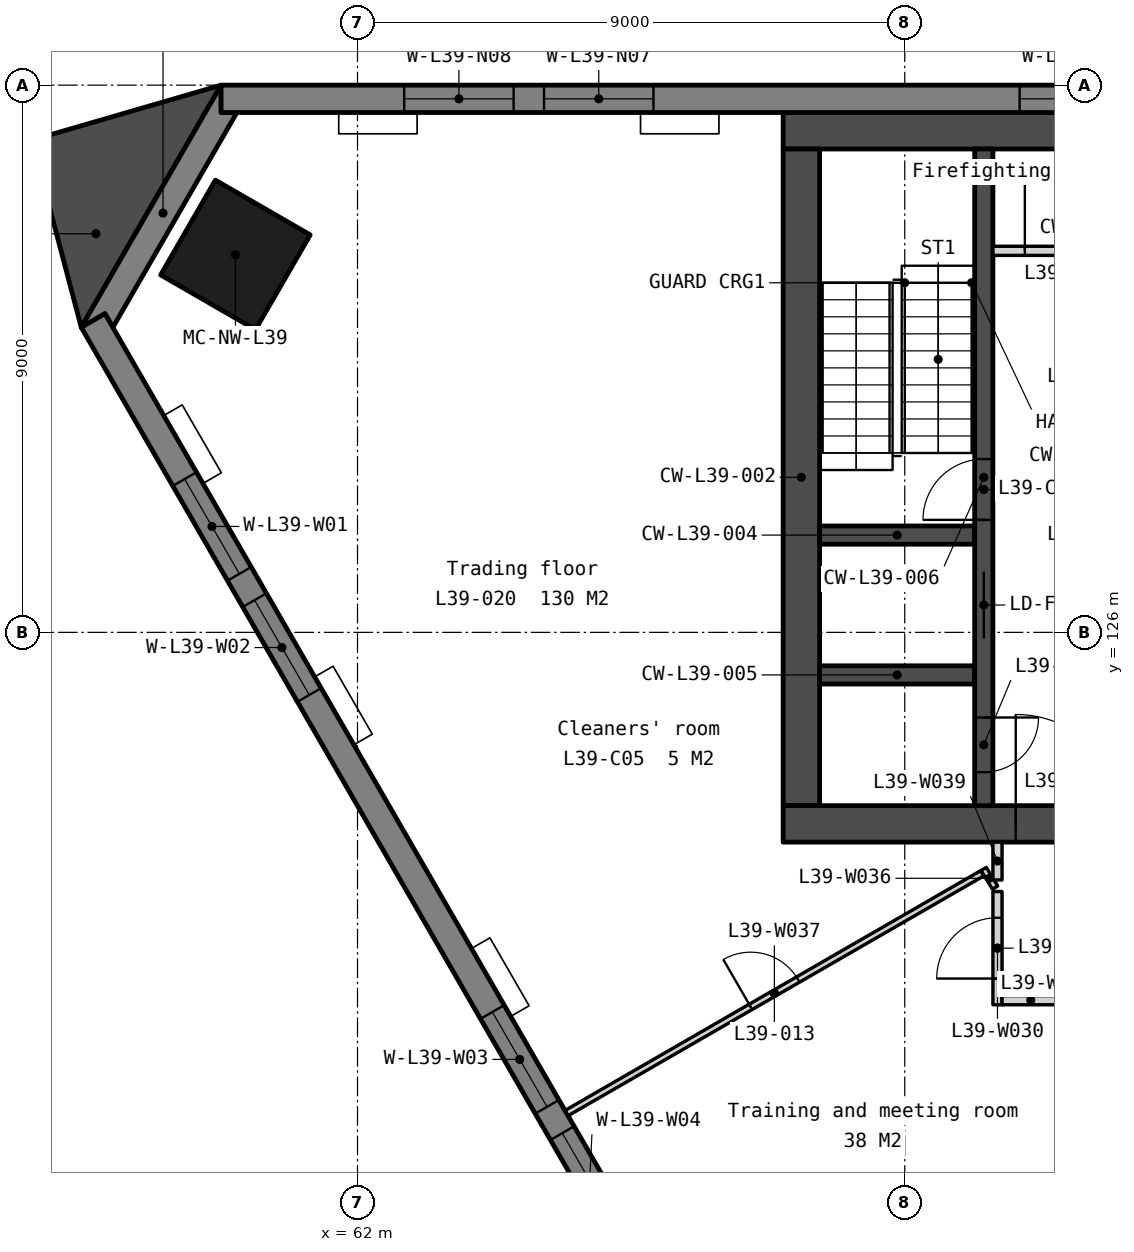
"""IFC4 building model, lengths in metres.
Left out: names, types, materials, properties, quantities, classifications, styles, units other than length and angle.
Written with IfcOpenShell. Run it as: python <this file> out.ifc"""

import sys

from ifc_helpers import new_model, si_unit, direction, frame, frame_2d, origin, origin_2d, place, context, subcontext, project, spatial, polyline, rectangle, outline, extrude, element, fill, save


model = new_model("IFC4")
c1 = context("Model", 3, precision=1e-05, world=origin(), true_north=direction((0.0, 1.0)))
c2 = subcontext(c1, "Body", "Model", "MODEL_VIEW")
j1 = project(units=[si_unit("LENGTHUNIT", "METRE"), si_unit("PLANEANGLEUNIT", "RADIAN")], contexts=[c1])
p1 = place(None, origin())
s1 = spatial("IfcSite", under=j1, at=p1, CompositionType="ELEMENT")
p2 = place(p1, origin())
s2 = spatial("IfcBuilding", under=s1, at=p2, CompositionType="ELEMENT")
p3 = place(p2, frame((0.0, 0.0, 155.9)))
s3 = spatial("IfcBuildingStorey", under=s2, at=p3, CompositionType="ELEMENT", Elevation=155.9)
p4 = place(p3, frame((59.993, 132.208, 0.0), z_axis=(0.0, 0.0, 1.0), x_axis=(-0.5, -0.866025403784, 0.0)))
e1 = element("IfcColumn", 1, at=p4, inside=s3, PredefinedType="COLUMN", context=c2, shape_type="SweptSolid", body=[
    extrude(rectangle(XDim=1.8, YDim=1.8, at=origin_2d()), origin(), (0.0, 0.0, 1.0), 3.9),
])
p5 = place(p3, frame((69.0, 134.25, 0.0), z_axis=(0.0, 0.0, 1.0), x_axis=(1.0, 0.0, 0.0)))
e2 = element("IfcWall", 2, at=p5, inside=s3, PredefinedType="SOLIDWALL", context=c2, shape_type="SweptSolid", body=[
    extrude(rectangle(XDim=22.0, YDim=0.6, at=frame_2d((11.0, 0.0))), origin(), (0.0, 0.0, 1.0), 3.75),
])
p6 = place(p3, frame((69.3, 133.95, 0.0), z_axis=(0.0, 0.0, 1.0), x_axis=(0.0, -1.0, 0.0)))
e3 = element("IfcWall", 3, at=p6, inside=s3, PredefinedType="SOLIDWALL", context=c2, shape_type="SweptSolid", body=[
    extrude(rectangle(XDim=10.8, YDim=0.6, at=frame_2d((5.4, 0.0))), origin(), (0.0, 0.0, 1.0), 3.75),
])
p7 = place(p3, frame((69.0, 122.85, 0.0), z_axis=(0.0, 0.0, 1.0), x_axis=(1.0, 0.0, 0.0)))
e4 = element("IfcWall", 4, at=p7, inside=s3, PredefinedType="SOLIDWALL", context=c2, shape_type="SweptSolid", body=[
    extrude(rectangle(XDim=22.0, YDim=0.6, at=frame_2d((11.0, 0.0))), origin(), (0.0, 0.0, 1.0), 3.75),
])
p8 = place(p7, frame((16.375, 0.0, 0.0)))
e5 = element("IfcOpeningElement", 5, at=p8, cuts=e4, PredefinedType="OPENING", context=c2, shape_type="SweptSolid", body=[
    extrude(rectangle(XDim=1.8, YDim=2.1, at=frame_2d((0.9, 1.05))), frame((0.0, 0.31, 0.0), z_axis=(0.0, -1.0, 0.0), x_axis=(1.0, 0.0, 0.0)), (0.0, 0.0, 1.0), 0.62),
])
p9 = place(p7, frame((3.825, 0.0, 0.0)))
e6 = element("IfcOpeningElement", 6, at=p9, cuts=e4, PredefinedType="OPENING", context=c2, shape_type="SweptSolid", body=[
    extrude(rectangle(XDim=1.8, YDim=2.1, at=frame_2d((0.9, 1.05))), frame((0.0, 0.31, 0.0), z_axis=(0.0, -1.0, 0.0), x_axis=(1.0, 0.0, 0.0)), (0.0, 0.0, 1.0), 0.62),
])
p10 = place(p7, frame((12.85, 0.0, 0.0)))
e7 = element("IfcOpeningElement", 7, at=p10, cuts=e4, PredefinedType="OPENING", context=c2, shape_type="SweptSolid", body=[
    extrude(rectangle(XDim=1.5, YDim=2.1, at=frame_2d((0.75, 1.05))), frame((0.0, 0.31, 0.0), z_axis=(0.0, -1.0, 0.0), x_axis=(1.0, 0.0, 0.0)), (0.0, 0.0, 1.0), 0.62),
])
for number, where, z_axis, x_axis in (
    (8, (69.6, 127.6, 0.0), (0.0, 0.0, 1.0), (1.0, 0.0, 0.0)),
    (9, (69.6, 125.3, 0.0), (0.0, 0.0, 1.0), (1.0, 0.0, 0.0)),
):
    element("IfcWall", number, at=place(p3, frame(where, z_axis=z_axis, x_axis=x_axis)), inside=s3, PredefinedType="SOLIDWALL", context=c2, shape_type="SweptSolid", body=[
        extrude(rectangle(XDim=2.55, YDim=0.3, at=frame_2d((1.275, 0.0))), origin(), (0.0, 0.0, 1.0), 3.75),
    ])
p11 = place(p3, frame((72.3, 133.95, 0.0), z_axis=(0.0, 0.0, 1.0), x_axis=(0.0, -1.0, 0.0)))
e10 = element("IfcWall", 10, at=p11, inside=s3, PredefinedType="SOLIDWALL", context=c2, shape_type="SweptSolid", body=[
    extrude(rectangle(XDim=10.8, YDim=0.3, at=frame_2d((5.4, 0.0))), origin(), (0.0, 0.0, 1.0), 3.75),
])
p12 = place(p11, frame((6.95, 0.0, 0.0)))
e11 = element("IfcOpeningElement", 11, at=p12, cuts=e10, PredefinedType="OPENING", context=c2, shape_type="SweptSolid", body=[
    extrude(rectangle(XDim=1.1, YDim=2.1, at=frame_2d((0.55, 1.05))), frame((0.0, 0.16, 0.0), z_axis=(0.0, -1.0, 0.0), x_axis=(1.0, 0.0, 0.0)), (0.0, 0.0, 1.0), 0.32),
])
p13 = place(p11, frame((9.35, 0.0, 0.0)))
e12 = element("IfcOpeningElement", 12, at=p13, cuts=e10, PredefinedType="OPENING", context=c2, shape_type="SweptSolid", body=[
    extrude(rectangle(XDim=0.9, YDim=2.1, at=frame_2d((0.45, 1.05))), frame((0.0, 0.16, 0.0), z_axis=(0.0, -1.0, 0.0), x_axis=(1.0, 0.0, 0.0)), (0.0, 0.0, 1.0), 0.32),
])
p14 = place(p11, frame((5.1, 0.0, 0.0)))
e13 = element("IfcOpeningElement", 13, at=p14, cuts=e10, PredefinedType="OPENING", context=c2, shape_type="SweptSolid", body=[
    extrude(rectangle(XDim=1.0, YDim=2.1, at=frame_2d((0.5, 1.05))), frame((0.0, 0.16, 0.0), z_axis=(0.0, -1.0, 0.0), x_axis=(1.0, 0.0, 0.0)), (0.0, 0.0, 1.0), 0.32),
])
p15 = place(p3, frame((72.45, 132.275, 0.0), z_axis=(0.0, 0.0, 1.0), x_axis=(1.0, 0.0, 0.0)))
e14 = element("IfcWall", 14, at=p15, inside=s3, PredefinedType="PARTITIONING", context=c2, shape_type="SweptSolid", body=[
    extrude(rectangle(XDim=3.45, YDim=0.15, at=frame_2d((1.725, 0.0))), origin(), (0.0, 0.0, 1.0), 3.75),
])
p16 = place(p15, frame((0.525, 0.0, 0.0)))
e15 = element("IfcOpeningElement", 15, at=p16, cuts=e14, PredefinedType="OPENING", context=c2, shape_type="SweptSolid", body=[
    extrude(rectangle(XDim=1.5, YDim=2.1, at=frame_2d((0.75, 1.05))), frame((0.0, 0.085, 0.0), z_axis=(0.0, -1.0, 0.0), x_axis=(1.0, 0.0, 0.0)), (0.0, 0.0, 1.0), 0.17),
])
p17 = place(p3, frame((0.0, 0.0, -0.15)))
e16 = element("IfcWall", 16, at=p17, inside=s3, PredefinedType="SOLIDWALL", context=c2, shape_type="SweptSolid", body=[
    extrude(outline(polyline([(59.757, 135.0), (59.757, 134.55), (60.017, 134.55), (57.977, 131.016), (57.847, 131.241), (57.457, 131.016), (59.757, 135.0)])), origin(), (0.0, 0.0, 1.0), 3.9),
])
p18 = place(p3, frame((100.243, 134.775, -0.15), z_axis=(0.0, 0.0, 1.0), x_axis=(-1.0, 0.0, 0.0)))
e17 = element("IfcWall", 17, at=p18, inside=s3, PredefinedType="SOLIDWALL", context=c2, shape_type="SweptSolid", body=[
    extrude(outline(polyline([(40.486, 0.0), (40.486, 3.9), (0.0, 3.9), (0.0, 0.0), (40.486, 0.0)])), frame((0.0, 0.225, 0.0), z_axis=(0.0, -1.0, 0.0), x_axis=(1.0, 0.0, 0.0)), (0.0, 0.0, 1.0), 0.45),
])
p19 = place(p18, frame((3.011, 0.0, 0.95)))
e18 = element("IfcOpeningElement", 18, at=p19, cuts=e17, PredefinedType="OPENING", context=c2, shape_type="SweptSolid", body=[
    extrude(rectangle(XDim=1.8, YDim=2.2, at=frame_2d((0.9, 1.1))), frame((0.0, 0.235, 0.0), z_axis=(0.0, -1.0, 0.0), x_axis=(1.0, 0.0, 0.0)), (0.0, 0.0, 1.0), 0.47),
])
p20 = place(p18, frame((5.311, 0.0, 0.95)))
e19 = element("IfcOpeningElement", 19, at=p20, cuts=e17, PredefinedType="OPENING", context=c2, shape_type="SweptSolid", body=[
    extrude(rectangle(XDim=1.8, YDim=2.2, at=frame_2d((0.9, 1.1))), frame((0.0, 0.235, 0.0), z_axis=(0.0, -1.0, 0.0), x_axis=(1.0, 0.0, 0.0)), (0.0, 0.0, 1.0), 0.47),
])
p21 = place(p18, frame((13.132, 0.0, 0.95)))
e20 = element("IfcOpeningElement", 20, at=p21, cuts=e17, PredefinedType="OPENING", context=c2, shape_type="SweptSolid", body=[
    extrude(rectangle(XDim=1.8, YDim=2.2, at=frame_2d((0.9, 1.1))), frame((0.0, 0.235, 0.0), z_axis=(0.0, -1.0, 0.0), x_axis=(1.0, 0.0, 0.0)), (0.0, 0.0, 1.0), 0.47),
])
p22 = place(p18, frame((15.432, 0.0, 0.95)))
e21 = element("IfcOpeningElement", 21, at=p22, cuts=e17, PredefinedType="OPENING", context=c2, shape_type="SweptSolid", body=[
    extrude(rectangle(XDim=1.8, YDim=2.2, at=frame_2d((0.9, 1.1))), frame((0.0, 0.235, 0.0), z_axis=(0.0, -1.0, 0.0), x_axis=(1.0, 0.0, 0.0)), (0.0, 0.0, 1.0), 0.47),
])
p23 = place(p18, frame((23.254, 0.0, 0.95)))
e22 = element("IfcOpeningElement", 22, at=p23, cuts=e17, PredefinedType="OPENING", context=c2, shape_type="SweptSolid", body=[
    extrude(rectangle(XDim=1.8, YDim=2.2, at=frame_2d((0.9, 1.1))), frame((0.0, 0.235, 0.0), z_axis=(0.0, -1.0, 0.0), x_axis=(1.0, 0.0, 0.0)), (0.0, 0.0, 1.0), 0.47),
])
p24 = place(p18, frame((25.554, 0.0, 0.95)))
e23 = element("IfcOpeningElement", 23, at=p24, cuts=e17, PredefinedType="OPENING", context=c2, shape_type="SweptSolid", body=[
    extrude(rectangle(XDim=1.8, YDim=2.2, at=frame_2d((0.9, 1.1))), frame((0.0, 0.235, 0.0), z_axis=(0.0, -1.0, 0.0), x_axis=(1.0, 0.0, 0.0)), (0.0, 0.0, 1.0), 0.47),
])
p25 = place(p18, frame((33.375, 0.0, 0.95)))
e24 = element("IfcOpeningElement", 24, at=p25, cuts=e17, PredefinedType="OPENING", context=c2, shape_type="SweptSolid", body=[
    extrude(rectangle(XDim=1.8, YDim=2.2, at=frame_2d((0.9, 1.1))), frame((0.0, 0.235, 0.0), z_axis=(0.0, -1.0, 0.0), x_axis=(1.0, 0.0, 0.0)), (0.0, 0.0, 1.0), 0.47),
])
p26 = place(p18, frame((35.675, 0.0, 0.95)))
e25 = element("IfcOpeningElement", 25, at=p26, cuts=e17, PredefinedType="OPENING", context=c2, shape_type="SweptSolid", body=[
    extrude(rectangle(XDim=1.8, YDim=2.2, at=frame_2d((0.9, 1.1))), frame((0.0, 0.235, 0.0), z_axis=(0.0, -1.0, 0.0), x_axis=(1.0, 0.0, 0.0)), (0.0, 0.0, 1.0), 0.47),
])
p27 = place(p3, frame((57.652, 131.129, -0.15), z_axis=(0.0, 0.0, 1.0), x_axis=(0.499997369791, -0.866026922331, 0.0)))
e26 = element("IfcWall", 26, at=p27, inside=s3, PredefinedType="SOLIDWALL", context=c2, shape_type="SweptSolid", body=[
    extrude(outline(polyline([(40.486, 0.0), (40.486, 3.9), (0.0, 3.9), (0.0, 0.0), (40.486, 0.0)])), frame((0.0, 0.225, 0.0), z_axis=(0.0, -1.0, 0.0), x_axis=(1.0, 0.0, 0.0)), (0.0, 0.0, 1.0), 0.45),
])
p28 = place(p27, frame((3.011, 0.0, 0.95)))
e27 = element("IfcOpeningElement", 27, at=p28, cuts=e26, PredefinedType="OPENING", context=c2, shape_type="SweptSolid", body=[
    extrude(rectangle(XDim=1.8, YDim=2.2, at=frame_2d((0.9, 1.1))), frame((0.0, 0.235, 0.0), z_axis=(0.0, -1.0, 0.0), x_axis=(1.0, 0.0, 0.0)), (0.0, 0.0, 1.0), 0.47),
])
p29 = place(p27, frame((5.311, 0.0, 0.95)))
e28 = element("IfcOpeningElement", 28, at=p29, cuts=e26, PredefinedType="OPENING", context=c2, shape_type="SweptSolid", body=[
    extrude(rectangle(XDim=1.8, YDim=2.2, at=frame_2d((0.9, 1.1))), frame((0.0, 0.235, 0.0), z_axis=(0.0, -1.0, 0.0), x_axis=(1.0, 0.0, 0.0)), (0.0, 0.0, 1.0), 0.47),
])
p30 = place(p27, frame((13.132, 0.0, 0.95)))
e29 = element("IfcOpeningElement", 29, at=p30, cuts=e26, PredefinedType="OPENING", context=c2, shape_type="SweptSolid", body=[
    extrude(rectangle(XDim=1.8, YDim=2.2, at=frame_2d((0.9, 1.1))), frame((0.0, 0.235, 0.0), z_axis=(0.0, -1.0, 0.0), x_axis=(1.0, 0.0, 0.0)), (0.0, 0.0, 1.0), 0.47),
])
p31 = place(p27, frame((15.432, 0.0, 0.95)))
e30 = element("IfcOpeningElement", 30, at=p31, cuts=e26, PredefinedType="OPENING", context=c2, shape_type="SweptSolid", body=[
    extrude(rectangle(XDim=1.8, YDim=2.2, at=frame_2d((0.9, 1.1))), frame((0.0, 0.235, 0.0), z_axis=(0.0, -1.0, 0.0), x_axis=(1.0, 0.0, 0.0)), (0.0, 0.0, 1.0), 0.47),
])
p32 = place(p27, frame((23.254, 0.0, 0.95)))
e31 = element("IfcOpeningElement", 31, at=p32, cuts=e26, PredefinedType="OPENING", context=c2, shape_type="SweptSolid", body=[
    extrude(rectangle(XDim=1.8, YDim=2.2, at=frame_2d((0.9, 1.1))), frame((0.0, 0.235, 0.0), z_axis=(0.0, -1.0, 0.0), x_axis=(1.0, 0.0, 0.0)), (0.0, 0.0, 1.0), 0.47),
])
p33 = place(p27, frame((25.554, 0.0, 0.95)))
e32 = element("IfcOpeningElement", 32, at=p33, cuts=e26, PredefinedType="OPENING", context=c2, shape_type="SweptSolid", body=[
    extrude(rectangle(XDim=1.8, YDim=2.2, at=frame_2d((0.9, 1.1))), frame((0.0, 0.235, 0.0), z_axis=(0.0, -1.0, 0.0), x_axis=(1.0, 0.0, 0.0)), (0.0, 0.0, 1.0), 0.47),
])
p34 = place(p27, frame((33.375, 0.0, 0.95)))
e33 = element("IfcOpeningElement", 33, at=p34, cuts=e26, PredefinedType="OPENING", context=c2, shape_type="SweptSolid", body=[
    extrude(rectangle(XDim=1.8, YDim=2.2, at=frame_2d((0.9, 1.1))), frame((0.0, 0.235, 0.0), z_axis=(0.0, -1.0, 0.0), x_axis=(1.0, 0.0, 0.0)), (0.0, 0.0, 1.0), 0.47),
])
p35 = place(p27, frame((35.675, 0.0, 0.95)))
e34 = element("IfcOpeningElement", 34, at=p35, cuts=e26, PredefinedType="OPENING", context=c2, shape_type="SweptSolid", body=[
    extrude(rectangle(XDim=1.8, YDim=2.2, at=frame_2d((0.9, 1.1))), frame((0.0, 0.235, 0.0), z_axis=(0.0, -1.0, 0.0), x_axis=(1.0, 0.0, 0.0)), (0.0, 0.0, 1.0), 0.47),
])
p36 = place(p3, frame((0.0, 0.0, -0.15)))
e35 = element("IfcWall", 35, at=p36, inside=s3, PredefinedType="SOLIDWALL", context=c2, shape_type="SweptSolid", body=[
    extrude(outline(polyline([(59.757, 135.0), (56.644, 134.096), (57.457, 131.016), (59.757, 135.0)])), origin(), (0.0, 0.0, 1.0), 3.9),
])
p37 = place(p3, frame((67.968, 113.71, 0.0), z_axis=(0.0, 0.0, 1.0), x_axis=(0.866013415921, 0.500020763015, 0.0)))
e36 = element("IfcWall", 36, at=p37, inside=s3, PredefinedType="PARTITIONING", context=c2, shape_type="SweptSolid", body=[
    extrude(rectangle(XDim=7.84, YDim=0.1, at=frame_2d((3.92, 0.0))), origin(), (0.0, 0.0, 1.0), 3.75),
])
p38 = place(p37, frame((3.47, 0.0, 0.0)))
e37 = element("IfcOpeningElement", 37, at=p38, cuts=e36, PredefinedType="OPENING", context=c2, shape_type="SweptSolid", body=[
    extrude(rectangle(XDim=0.9, YDim=2.1, at=frame_2d((0.45, 1.05))), frame((0.0, 0.06, 0.0), z_axis=(0.0, -1.0, 0.0), x_axis=(1.0, 0.0, 0.0)), (0.0, 0.0, 1.0), 0.12),
])
p39 = place(p3, frame((72.525, 119.875, 0.0), z_axis=(0.0, 0.0, 1.0), x_axis=(0.0, 1.0, 0.0)))
e38 = element("IfcWall", 38, at=p39, inside=s3, PredefinedType="PARTITIONING", context=c2, shape_type="SweptSolid", body=[
    extrude(rectangle(XDim=1.863, YDim=0.15, at=frame_2d((0.931, 0.0))), origin(), (0.0, 0.0, 1.0), 3.75),
])
p40 = place(p39, frame((0.431, 0.0, 0.0)))
e39 = element("IfcOpeningElement", 39, at=p40, cuts=e38, PredefinedType="OPENING", context=c2, shape_type="SweptSolid", body=[
    extrude(rectangle(XDim=1.0, YDim=2.1, at=frame_2d((0.5, 1.05))), frame((0.0, 0.085, 0.0), z_axis=(0.0, -1.0, 0.0), x_axis=(1.0, 0.0, 0.0)), (0.0, 0.0, 1.0), 0.17),
])
p41 = place(p3, frame((72.6, 119.95, 0.0), z_axis=(0.0, 0.0, 1.0), x_axis=(1.0, 0.0, 0.0)))
e40 = element("IfcWall", 40, at=p41, inside=s3, PredefinedType="PARTITIONING", context=c2, shape_type="SweptSolid", body=[
    extrude(rectangle(XDim=0.945, YDim=0.15, at=frame_2d((0.473, 0.0))), origin(), (0.0, 0.0, 1.0), 3.75),
])
p42 = place(p3, frame((72.298, 122.109, 0.0), z_axis=(0.0, 0.0, 1.0), x_axis=(0.522244349168, -0.852795895723, 0.0)))
e41 = element("IfcWall", 41, at=p42, inside=s3, PredefinedType="PARTITIONING", context=c2, shape_type="SweptSolid", body=[
    extrude(rectangle(XDim=0.36, YDim=0.1, at=frame_2d((0.18, 0.0))), origin(), (0.0, 0.0, 1.0), 3.75),
])
p43 = place(p3, frame((65.439, 118.094, 0.0), z_axis=(0.0, 0.0, 1.0), x_axis=(0.866161367057, 0.499764430726, 0.0)))
e42 = element("IfcWall", 42, at=p43, inside=s3, PredefinedType="PARTITIONING", context=c2, shape_type="SweptSolid", body=[
    extrude(rectangle(XDim=7.888, YDim=0.1, at=frame_2d((3.944, 0.0))), origin(), (0.0, 0.0, 1.0), 3.75),
])
p44 = place(p43, frame((3.494, 0.0, 0.0)))
e43 = element("IfcOpeningElement", 43, at=p44, cuts=e42, PredefinedType="OPENING", context=c2, shape_type="SweptSolid", body=[
    extrude(rectangle(XDim=0.9, YDim=2.1, at=frame_2d((0.45, 1.05))), frame((0.0, 0.06, 0.0), z_axis=(0.0, -1.0, 0.0), x_axis=(1.0, 0.0, 0.0)), (0.0, 0.0, 1.0), 0.12),
])
p45 = place(p3, frame((72.525, 121.927, 0.0), z_axis=(0.0, 0.0, 1.0), x_axis=(0.0, 1.0, 0.0)))
e44 = element("IfcWall", 44, at=p45, inside=s3, PredefinedType="PARTITIONING", context=c2, shape_type="SweptSolid", body=[
    extrude(rectangle(XDim=0.622, YDim=0.15, at=frame_2d((0.311, 0.0))), origin(), (0.0, 0.0, 1.0), 3.75),
])
p46 = place(p12, origin())
e45 = element("IfcDoor", 45, at=p46, inside=s3, OperationType="SLIDING_TO_LEFT", PredefinedType="DOOR", context=c2, shape_type="SweptSolid", body=[
    extrude(rectangle(XDim=1.1, YDim=2.1, at=frame_2d((0.55, 1.05))), frame((0.0, 0.025, 0.0), z_axis=(0.0, -1.0, 0.0), x_axis=(1.0, 0.0, 0.0)), (0.0, 0.0, 1.0), 0.05),
])
fill(e11, e45)
p47 = place(p9, origin())
e46 = element("IfcDoor", 46, at=p47, inside=s3, OperationType="DOUBLE_DOOR_DOUBLE_SWING", PredefinedType="DOOR", context=c2, shape_type="SweptSolid", body=[
    extrude(rectangle(XDim=1.8, YDim=2.1, at=frame_2d((0.9, 1.05))), frame((0.0, 0.025, 0.0), z_axis=(0.0, -1.0, 0.0), x_axis=(1.0, 0.0, 0.0)), (0.0, 0.0, 1.0), 0.05),
])
fill(e6, e46)
p48 = place(p16, origin())
e47 = element("IfcDoor", 47, at=p48, inside=s3, OperationType="DOUBLE_DOOR_DOUBLE_SWING", PredefinedType="DOOR", context=c2, shape_type="SweptSolid", body=[
    extrude(rectangle(XDim=1.5, YDim=2.1, at=frame_2d((0.75, 1.05))), frame((0.0, 0.025, 0.0), z_axis=(0.0, -1.0, 0.0), x_axis=(1.0, 0.0, 0.0)), (0.0, 0.0, 1.0), 0.05),
])
fill(e15, e47)
p49 = place(p13, origin())
e48 = element("IfcDoor", 48, at=p49, inside=s3, OperationType="SINGLE_SWING_LEFT", PredefinedType="DOOR", context=c2, shape_type="SweptSolid", body=[
    extrude(rectangle(XDim=0.9, YDim=2.1, at=frame_2d((0.45, 1.05))), frame((0.0, 0.025, 0.0), z_axis=(0.0, -1.0, 0.0), x_axis=(1.0, 0.0, 0.0)), (0.0, 0.0, 1.0), 0.05),
])
fill(e12, e48)
p50 = place(p14, origin())
e49 = element("IfcDoor", 49, at=p50, inside=s3, OperationType="SINGLE_SWING_RIGHT", PredefinedType="DOOR", context=c2, shape_type="SweptSolid", body=[
    extrude(rectangle(XDim=1.0, YDim=2.1, at=frame_2d((0.5, 1.05))), frame((0.0, 0.025, 0.0), z_axis=(0.0, -1.0, 0.0), x_axis=(1.0, 0.0, 0.0)), (0.0, 0.0, 1.0), 0.05),
])
fill(e13, e49)
p51 = place(p24, origin())
e50 = element("IfcWindow", 50, at=p51, inside=s3, PartitioningType="SINGLE_PANEL", PredefinedType="WINDOW", context=c2, shape_type="SweptSolid", body=[
    extrude(rectangle(XDim=1.8, YDim=2.2, at=frame_2d((0.9, 1.1))), frame((0.0, 0.03, 0.0), z_axis=(0.0, -1.0, 0.0), x_axis=(1.0, 0.0, 0.0)), (0.0, 0.0, 1.0), 0.06),
])
fill(e23, e50)
p52 = place(p25, origin())
e51 = element("IfcWindow", 51, at=p52, inside=s3, PartitioningType="SINGLE_PANEL", PredefinedType="WINDOW", context=c2, shape_type="SweptSolid", body=[
    extrude(rectangle(XDim=1.8, YDim=2.2, at=frame_2d((0.9, 1.1))), frame((0.0, 0.03, 0.0), z_axis=(0.0, -1.0, 0.0), x_axis=(1.0, 0.0, 0.0)), (0.0, 0.0, 1.0), 0.06),
])
fill(e24, e51)
p53 = place(p26, origin())
e52 = element("IfcWindow", 52, at=p53, inside=s3, PartitioningType="SINGLE_PANEL", PredefinedType="WINDOW", context=c2, shape_type="SweptSolid", body=[
    extrude(rectangle(XDim=1.8, YDim=2.2, at=frame_2d((0.9, 1.1))), frame((0.0, 0.03, 0.0), z_axis=(0.0, -1.0, 0.0), x_axis=(1.0, 0.0, 0.0)), (0.0, 0.0, 1.0), 0.06),
])
fill(e25, e52)
p54 = place(p28, origin())
e53 = element("IfcWindow", 53, at=p54, inside=s3, PartitioningType="SINGLE_PANEL", PredefinedType="WINDOW", context=c2, shape_type="SweptSolid", body=[
    extrude(rectangle(XDim=1.8, YDim=2.2, at=frame_2d((0.9, 1.1))), frame((0.0, 0.03, 0.0), z_axis=(0.0, -1.0, 0.0), x_axis=(1.0, 0.0, 0.0)), (0.0, 0.0, 1.0), 0.06),
])
fill(e27, e53)
p55 = place(p29, origin())
e54 = element("IfcWindow", 54, at=p55, inside=s3, PartitioningType="SINGLE_PANEL", PredefinedType="WINDOW", context=c2, shape_type="SweptSolid", body=[
    extrude(rectangle(XDim=1.8, YDim=2.2, at=frame_2d((0.9, 1.1))), frame((0.0, 0.03, 0.0), z_axis=(0.0, -1.0, 0.0), x_axis=(1.0, 0.0, 0.0)), (0.0, 0.0, 1.0), 0.06),
])
fill(e28, e54)
p56 = place(p30, origin())
e55 = element("IfcWindow", 55, at=p56, inside=s3, PartitioningType="SINGLE_PANEL", PredefinedType="WINDOW", context=c2, shape_type="SweptSolid", body=[
    extrude(rectangle(XDim=1.8, YDim=2.2, at=frame_2d((0.9, 1.1))), frame((0.0, 0.03, 0.0), z_axis=(0.0, -1.0, 0.0), x_axis=(1.0, 0.0, 0.0)), (0.0, 0.0, 1.0), 0.06),
])
fill(e29, e55)
p57 = place(p31, origin())
e56 = element("IfcWindow", 56, at=p57, inside=s3, PartitioningType="SINGLE_PANEL", PredefinedType="WINDOW", context=c2, shape_type="SweptSolid", body=[
    extrude(rectangle(XDim=1.8, YDim=2.2, at=frame_2d((0.9, 1.1))), frame((0.0, 0.03, 0.0), z_axis=(0.0, -1.0, 0.0), x_axis=(1.0, 0.0, 0.0)), (0.0, 0.0, 1.0), 0.06),
])
fill(e30, e56)
p58 = place(p40, origin())
e57 = element("IfcDoor", 57, at=p58, inside=s3, OperationType="SINGLE_SWING_LEFT", PredefinedType="DOOR", context=c2, shape_type="SweptSolid", body=[
    extrude(rectangle(XDim=1.0, YDim=2.1, at=frame_2d((0.5, 1.05))), frame((0.0, 0.025, 0.0), z_axis=(0.0, -1.0, 0.0), x_axis=(1.0, 0.0, 0.0)), (0.0, 0.0, 1.0), 0.05),
])
fill(e39, e57)
p59 = place(p44, origin())
e58 = element("IfcDoor", 58, at=p59, inside=s3, OperationType="SINGLE_SWING_LEFT", PredefinedType="DOOR", context=c2, shape_type="SweptSolid", body=[
    extrude(rectangle(XDim=0.9, YDim=2.1, at=frame_2d((0.45, 1.05))), frame((0.0, 0.025, 0.0), z_axis=(0.0, -1.0, 0.0), x_axis=(1.0, 0.0, 0.0)), (0.0, 0.0, 1.0), 0.05),
])
fill(e43, e58)
save(model, sys.argv[1])
